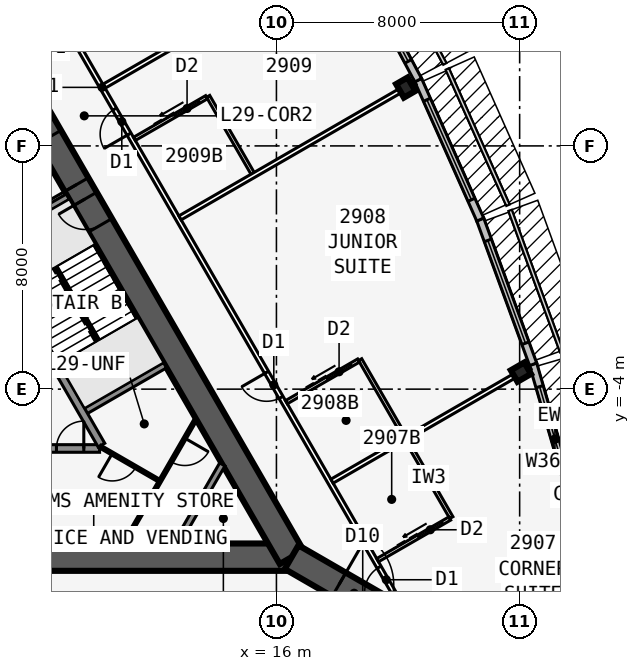
"""IFC4 building model, lengths in metres.
Left out: names, types, materials, properties, quantities, classifications, styles, units other than length and angle.
Written with IfcOpenShell. Run it as: python <this file> out.ifc"""

import sys

from ifc_helpers import new_model, si_unit, direction, frame, frame_2d, origin, origin_2d, place, context, subcontext, project, spatial, rectangle, i_section, extrude, element, fill, save


model = new_model("IFC4")
c1 = context("Model", 3, precision=1e-05, world=origin(), true_north=direction((0.0, 1.0)))
c2 = subcontext(c1, "Body", "Model", "MODEL_VIEW")
j1 = project(units=[si_unit("LENGTHUNIT", "METRE"), si_unit("PLANEANGLEUNIT", "RADIAN")], contexts=[c1])
p1 = place(None, origin())
s1 = spatial("IfcSite", under=j1, at=p1, CompositionType="ELEMENT")
p2 = place(p1, origin())
s2 = spatial("IfcBuilding", under=s1, at=p2, CompositionType="ELEMENT")
p3 = place(p2, frame((0.0, 0.0, 114.7)))
s3 = spatial("IfcBuildingStorey", under=s2, at=p3, CompositionType="ELEMENT", Elevation=114.7)
p4 = place(p3, frame((-16.5, -9.526, 0.0), z_axis=(0.0, 0.0, 1.0), x_axis=(1.0, 0.0, 0.0)))
e1 = element("IfcWall", 1, at=p4, inside=s3, PredefinedType="SHEAR", context=c2, shape_type="SweptSolid", body=[
    extrude(rectangle(XDim=33.0, YDim=0.9, at=frame_2d((16.5, 0.0))), origin(), (0.0, 0.0, 1.0), 3.4),
])
p5 = place(p4, frame((14.05, 0.0, 0.0)))
e2 = element("IfcOpeningElement", 2, at=p5, cuts=e1, PredefinedType="OPENING", context=c2, shape_type="SweptSolid", body=[
    extrude(rectangle(XDim=1.8, YDim=2.13, at=frame_2d((0.9, 1.065))), frame((0.0, 0.46, 0.0), z_axis=(0.0, -1.0, 0.0), x_axis=(1.0, 0.0, 0.0)), (0.0, 0.0, 1.0), 0.92),
])
p6 = place(p3, frame((-0.55, -5.951, 0.0), z_axis=(0.0, 0.0, 1.0), x_axis=(1.0, 0.0, 0.0)))
e3 = element("IfcWall", 3, at=p6, inside=s3, PredefinedType="SOLIDWALL", context=c2, shape_type="SweptSolid", body=[
    extrude(rectangle(XDim=10.733, YDim=0.25, at=frame_2d((5.366, 0.0))), origin(), (0.0, 0.0, 1.0), 3.235),
])
p7 = place(p6, frame((9.314, 0.0, 0.0)))
e4 = element("IfcOpeningElement", 4, at=p7, cuts=e3, PredefinedType="OPENING", context=c2, shape_type="SweptSolid", body=[
    extrude(rectangle(XDim=0.9, YDim=2.13, at=frame_2d((0.45, 1.065))), frame((0.0, 0.135, 0.0), z_axis=(0.0, -1.0, 0.0), x_axis=(1.0, 0.0, 0.0)), (0.0, 0.0, 1.0), 0.27),
])
p8 = place(p6, frame((1.05, 0.0, 0.0)))
e5 = element("IfcOpeningElement", 5, at=p8, cuts=e3, PredefinedType="OPENING", context=c2, shape_type="SweptSolid", body=[
    extrude(rectangle(XDim=1.1, YDim=2.13, at=frame_2d((0.55, 1.065))), frame((0.0, 0.135, 0.0), z_axis=(0.0, -1.0, 0.0), x_axis=(1.0, 0.0, 0.0)), (0.0, 0.0, 1.0), 0.27),
])
p9 = place(p6, frame((4.05, 0.0, 0.0)))
e6 = element("IfcOpeningElement", 6, at=p9, cuts=e3, PredefinedType="OPENING", context=c2, shape_type="SweptSolid", body=[
    extrude(rectangle(XDim=1.1, YDim=2.13, at=frame_2d((0.55, 1.065))), frame((0.0, 0.135, 0.0), z_axis=(0.0, -1.0, 0.0), x_axis=(1.0, 0.0, 0.0)), (0.0, 0.0, 1.0), 0.27),
])
p10 = place(p3, frame((16.5, -9.526, 0.0), z_axis=(0.0, 0.0, 1.0), x_axis=(-0.499999749417, 0.866025548458, 0.0)))
e7 = element("IfcWall", 7, at=p10, inside=s3, PredefinedType="SHEAR", context=c2, shape_type="SweptSolid", body=[
    extrude(rectangle(XDim=33.0, YDim=0.9, at=frame_2d((16.5, 0.0))), origin(), (0.0, 0.0, 1.0), 3.4),
])
p11 = place(p10, frame((14.15, 0.0, 0.0)))
e8 = element("IfcOpeningElement", 8, at=p11, cuts=e7, PredefinedType="OPENING", context=c2, shape_type="SweptSolid", body=[
    extrude(rectangle(XDim=1.8, YDim=2.13, at=frame_2d((0.9, 1.065))), frame((0.0, 0.46, 0.0), z_axis=(0.0, -1.0, 0.0), x_axis=(1.0, 0.0, 0.0)), (0.0, 0.0, 1.0), 0.92),
])
p12 = place(p10, frame((12.6, 0.0, 0.0)))
e9 = element("IfcOpeningElement", 9, at=p12, cuts=e7, PredefinedType="OPENING", context=c2, shape_type="SweptSolid", body=[
    extrude(rectangle(XDim=1.0, YDim=2.13, at=frame_2d((0.5, 1.065))), frame((0.0, 0.46, 0.0), z_axis=(0.0, -1.0, 0.0), x_axis=(1.0, 0.0, 0.0)), (0.0, 0.0, 1.0), 0.92),
])
p13 = place(p3, frame((10.245, -5.843, 0.0), z_axis=(0.0, 0.0, 1.0), x_axis=(-0.499993009313, 0.866029439822, 0.0)))
e10 = element("IfcWall", 10, at=p13, inside=s3, PredefinedType="SOLIDWALL", context=c2, shape_type="SweptSolid", body=[
    extrude(rectangle(XDim=7.733, YDim=0.25, at=frame_2d((3.866, 0.0))), origin(), (0.0, 0.0, 1.0), 3.235),
])
for number, where, z_axis, x_axis in (
    (11, (9.629, -4.775, 0.0), (0.0, 0.0, 1.0), (0.866, 0.5, 0.0)),
    (12, (6.429, 0.767, 0.0), (0.0, 0.0, 1.0), (0.866, 0.5, 0.0)),
):
    element("IfcWall", number, at=place(p3, frame(where, z_axis=z_axis, x_axis=x_axis)), inside=s3, PredefinedType="SOLIDWALL", context=c2, shape_type="SweptSolid", body=[
        extrude(rectangle(XDim=3.125, YDim=0.2, at=frame_2d((1.562, 0.0))), origin(), (0.0, 0.0, 1.0), 3.235),
    ])
p14 = place(p3, frame((16.5, -9.526, 0.0), z_axis=(0.0, 0.0, 1.0), x_axis=(0.866031398331, -0.499989616998, 0.0)))
e13 = element("IfcWall", 13, at=p14, inside=s3, PredefinedType="SHEAR", context=c2, shape_type="SweptSolid", body=[
    extrude(rectangle(XDim=4.746, YDim=0.9, at=frame_2d((2.373, 0.0))), origin(), (0.0, 0.0, 1.0), 3.4),
])
p15 = place(p14, frame((1.8, 0.0, 0.0)))
e14 = element("IfcOpeningElement", 14, at=p15, cuts=e13, PredefinedType="OPENING", context=c2, shape_type="SweptSolid", body=[
    extrude(rectangle(XDim=1.8, YDim=2.13, at=frame_2d((0.9, 1.065))), frame((0.0, 0.46, 0.0), z_axis=(0.0, -1.0, 0.0), x_axis=(1.0, 0.0, 0.0)), (0.0, 0.0, 1.0), 0.92),
])
for number, where, z_axis, x_axis in (
    (15, (24.041, -3.44, 0.0), (0.0, 0.0, 1.0), (-0.5, 0.866, 0.0)),
    (16, (20.254, 5.92, 0.0), (0.0, 0.0, 1.0), (0.866, 0.5, 0.0)),
):
    element("IfcColumn", number, at=place(p3, frame(where, z_axis=z_axis, x_axis=x_axis)), inside=s3, PredefinedType="COLUMN", context=c2, shape_type="SweptSolid", body=[
        extrude(i_section(OverallWidth=0.437, OverallDepth=0.513, WebThickness=0.061, FlangeThickness=0.097, at=origin_2d()), origin(), (0.0, 0.0, 1.0), 3.4),
    ])
p16 = place(p3, frame((25.88, -8.118, 0.0), z_axis=(0.0, 0.0, 1.0), x_axis=(-0.279528287117, 0.960137457191, 0.0)))
e17 = element("IfcWall", 17, at=p16, inside=s3, PredefinedType="STANDARD", context=c2, shape_type="SweptSolid", body=[
    extrude(rectangle(XDim=5.148, YDim=0.25, at=frame_2d((2.574, 0.0))), origin(), (0.0, 0.0, 1.0), 3.235),
])
p17 = place(p16, frame((0.774, 0.0, 0.45)))
e18 = element("IfcOpeningElement", 18, at=p17, cuts=e17, PredefinedType="OPENING", context=c2, shape_type="SweptSolid", body=[
    extrude(rectangle(XDim=3.6, YDim=2.4, at=frame_2d((1.8, 1.2))), frame((0.0, 0.135, 0.0), z_axis=(0.0, -1.0, 0.0), x_axis=(1.0, 0.0, 0.0)), (0.0, 0.0, 1.0), 0.27),
])
p18 = place(p3, frame((24.444, -3.183, 0.0), z_axis=(0.0, 0.0, 1.0), x_axis=(-0.343225593282, 0.939252996863, 0.0)))
e19 = element("IfcWall", 19, at=p18, inside=s3, PredefinedType="STANDARD", context=c2, shape_type="SweptSolid", body=[
    extrude(rectangle(XDim=5.076, YDim=0.25, at=frame_2d((2.538, 0.0))), origin(), (0.0, 0.0, 1.0), 3.235),
])
p19 = place(p18, frame((0.738, 0.0, 0.45)))
e20 = element("IfcOpeningElement", 20, at=p19, cuts=e19, PredefinedType="OPENING", context=c2, shape_type="SweptSolid", body=[
    extrude(rectangle(XDim=3.6, YDim=2.4, at=frame_2d((1.8, 1.2))), frame((0.0, 0.135, 0.0), z_axis=(0.0, -1.0, 0.0), x_axis=(1.0, 0.0, 0.0)), (0.0, 0.0, 1.0), 0.27),
])
p20 = place(p3, frame((22.705, 1.576, 0.0), z_axis=(0.0, 0.0, 1.0), x_axis=(-0.406832200364, 0.913502906808, 0.0)))
e21 = element("IfcWall", 21, at=p20, inside=s3, PredefinedType="STANDARD", context=c2, shape_type="SweptSolid", body=[
    extrude(rectangle(XDim=5.028, YDim=0.25, at=frame_2d((2.514, 0.0))), origin(), (0.0, 0.0, 1.0), 3.235),
])
p21 = place(p20, frame((0.714, 0.0, 0.45)))
e22 = element("IfcOpeningElement", 22, at=p21, cuts=e21, PredefinedType="OPENING", context=c2, shape_type="SweptSolid", body=[
    extrude(rectangle(XDim=3.6, YDim=2.4, at=frame_2d((1.8, 1.2))), frame((0.0, 0.135, 0.0), z_axis=(0.0, -1.0, 0.0), x_axis=(1.0, 0.0, 0.0)), (0.0, 0.0, 1.0), 0.27),
])
p22 = place(p3, frame((20.663, 6.161, 0.0), z_axis=(0.0, 0.0, 1.0), x_axis=(-0.469404966864, 0.882982999317, 0.0)))
e23 = element("IfcWall", 23, at=p22, inside=s3, PredefinedType="STANDARD", context=c2, shape_type="SweptSolid", body=[
    extrude(rectangle(XDim=5.003, YDim=0.25, at=frame_2d((2.501, 0.0))), origin(), (0.0, 0.0, 1.0), 3.235),
])
p23 = place(p22, frame((0.701, 0.0, 0.45)))
e24 = element("IfcOpeningElement", 24, at=p23, cuts=e23, PredefinedType="OPENING", context=c2, shape_type="SweptSolid", body=[
    extrude(rectangle(XDim=3.6, YDim=2.4, at=frame_2d((1.8, 1.2))), frame((0.0, 0.135, 0.0), z_axis=(0.0, -1.0, 0.0), x_axis=(1.0, 0.0, 0.0)), (0.0, 0.0, 1.0), 0.27),
])
p24 = place(p3, frame((20.027, -10.985, 0.0), z_axis=(0.0, 0.0, 1.0), x_axis=(-0.500001677587, 0.866024435227, 0.0)))
e25 = element("IfcWall", 25, at=p24, inside=s3, PredefinedType="PARTITIONING", context=c2, shape_type="SweptSolid", body=[
    extrude(rectangle(XDim=39.054, YDim=0.15, at=frame_2d((19.527, 0.0))), origin(), (0.0, 0.0, 1.0), 3.235),
])
p25 = place(p24, frame((0.352, 0.0, 0.0)))
e26 = element("IfcOpeningElement", 26, at=p25, cuts=e25, PredefinedType="OPENING", context=c2, shape_type="SweptSolid", body=[
    extrude(rectangle(XDim=0.95, YDim=2.13, at=frame_2d((0.475, 1.065))), frame((0.0, 0.085, 0.0), z_axis=(0.0, -1.0, 0.0), x_axis=(1.0, 0.0, 0.0)), (0.0, 0.0, 1.0), 0.17),
])
p26 = place(p24, frame((7.752, 0.0, 0.0)))
e27 = element("IfcOpeningElement", 27, at=p26, cuts=e25, PredefinedType="OPENING", context=c2, shape_type="SweptSolid", body=[
    extrude(rectangle(XDim=0.95, YDim=2.13, at=frame_2d((0.475, 1.065))), frame((0.0, 0.085, 0.0), z_axis=(0.0, -1.0, 0.0), x_axis=(1.0, 0.0, 0.0)), (0.0, 0.0, 1.0), 0.17),
])
p27 = place(p24, frame((17.752, 0.0, 0.0)))
e28 = element("IfcOpeningElement", 28, at=p27, cuts=e25, PredefinedType="OPENING", context=c2, shape_type="SweptSolid", body=[
    extrude(rectangle(XDim=0.95, YDim=2.13, at=frame_2d((0.475, 1.065))), frame((0.0, 0.085, 0.0), z_axis=(0.0, -1.0, 0.0), x_axis=(1.0, 0.0, 0.0)), (0.0, 0.0, 1.0), 0.17),
])
p28 = place(p24, frame((22.152, 0.0, 0.0)))
e29 = element("IfcOpeningElement", 29, at=p28, cuts=e25, PredefinedType="OPENING", context=c2, shape_type="SweptSolid", body=[
    extrude(rectangle(XDim=0.95, YDim=2.13, at=frame_2d((0.475, 1.065))), frame((0.0, 0.085, 0.0), z_axis=(0.0, -1.0, 0.0), x_axis=(1.0, 0.0, 0.0)), (0.0, 0.0, 1.0), 0.17),
])
p29 = place(p24, frame((27.152, 0.0, 0.0)))
e30 = element("IfcOpeningElement", 30, at=p29, cuts=e25, PredefinedType="OPENING", context=c2, shape_type="SweptSolid", body=[
    extrude(rectangle(XDim=0.95, YDim=2.13, at=frame_2d((0.475, 1.065))), frame((0.0, 0.085, 0.0), z_axis=(0.0, -1.0, 0.0), x_axis=(1.0, 0.0, 0.0)), (0.0, 0.0, 1.0), 0.17),
])
p30 = place(p24, frame((36.546, 0.0, 0.0)))
e31 = element("IfcOpeningElement", 31, at=p30, cuts=e25, PredefinedType="OPENING", context=c2, shape_type="SweptSolid", body=[
    extrude(rectangle(XDim=0.95, YDim=2.13, at=frame_2d((0.475, 1.065))), frame((0.0, 0.085, 0.0), z_axis=(0.0, -1.0, 0.0), x_axis=(1.0, 0.0, 0.0)), (0.0, 0.0, 1.0), 0.17),
])
p31 = place(p3, frame((17.829, -7.027, 0.0), z_axis=(0.0, 0.0, 1.0), x_axis=(0.866029804378, 0.499992377871, 0.0)))
e32 = element("IfcWall", 32, at=p31, inside=s3, PredefinedType="PARTITIONING", context=c2, shape_type="SweptSolid", body=[
    extrude(rectangle(XDim=7.516, YDim=0.15, at=frame_2d((3.758, 0.0))), origin(), (0.0, 0.0, 1.0), 2.389),
])
p32 = place(p3, frame((12.829, 1.633, 0.0), z_axis=(0.0, 0.0, 1.0), x_axis=(0.866027015393, 0.499997208602, 0.0)))
e33 = element("IfcWall", 33, at=p32, inside=s3, PredefinedType="PARTITIONING", context=c2, shape_type="SweptSolid", body=[
    extrude(rectangle(XDim=8.922, YDim=0.15, at=frame_2d((4.461, 0.0))), origin(), (0.0, 0.0, 1.0), 2.389),
])
p33 = place(p3, frame((10.329, 5.963, 0.0), z_axis=(0.0, 0.0, 1.0), x_axis=(0.866025170687, 0.500000403736, 0.0)))
e34 = element("IfcWall", 34, at=p33, inside=s3, PredefinedType="PARTITIONING", context=c2, shape_type="SweptSolid", body=[
    extrude(rectangle(XDim=9.099, YDim=0.15, at=frame_2d((4.549, 0.0))), origin(), (0.0, 0.0, 1.0), 2.389),
])
p34 = place(p3, frame((21.753, -8.225, 0.0), z_axis=(0.0, 0.0, 1.0), x_axis=(-0.499990139034, 0.866031096941, 0.0)))
e35 = element("IfcWall", 35, at=p34, inside=s3, PredefinedType="PLUMBINGWALL", context=c2, shape_type="SweptSolid", body=[
    extrude(rectangle(XDim=3.0, YDim=0.12, at=frame_2d((1.5, 0.0))), origin(), (0.0, 0.0, 1.0), 3.235),
])
p35 = place(p3, frame((19.329, -9.625, 0.0), z_axis=(0.0, 0.0, 1.0), x_axis=(0.866035715982, 0.499982138324, 0.0)))
e36 = element("IfcWall", 36, at=p35, inside=s3, PredefinedType="PLUMBINGWALL", context=c2, shape_type="SweptSolid", body=[
    extrude(rectangle(XDim=2.74, YDim=0.12, at=frame_2d((1.37, 0.0))), origin(), (0.0, 0.0, 1.0), 3.235),
])
p36 = place(p35, frame((1.55, 0.0, 0.0)))
e37 = element("IfcOpeningElement", 37, at=p36, cuts=e36, PredefinedType="OPENING", context=c2, shape_type="SweptSolid", body=[
    extrude(rectangle(XDim=0.9, YDim=2.13, at=frame_2d((0.45, 1.065))), frame((0.0, 0.07, 0.0), z_axis=(0.0, -1.0, 0.0), x_axis=(1.0, 0.0, 0.0)), (0.0, 0.0, 1.0), 0.14),
])
p37 = place(p3, frame((20.253, -5.627, 0.0), z_axis=(0.0, 0.0, 1.0), x_axis=(-0.50002537861, 0.866010750942, 0.0)))
e38 = element("IfcWall", 38, at=p37, inside=s3, PredefinedType="PLUMBINGWALL", context=c2, shape_type="SweptSolid", body=[
    extrude(rectangle(XDim=3.0, YDim=0.12, at=frame_2d((1.5, 0.0))), origin(), (0.0, 0.0, 1.0), 3.235),
])
p38 = place(p3, frame((16.329, -4.429, 0.0), z_axis=(0.0, 0.0, 1.0), x_axis=(0.865997131366, 0.500048966069, 0.0)))
e39 = element("IfcWall", 39, at=p38, inside=s3, PredefinedType="PLUMBINGWALL", context=c2, shape_type="SweptSolid", body=[
    extrude(rectangle(XDim=2.74, YDim=0.12, at=frame_2d((1.37, 0.0))), origin(), (0.0, 0.0, 1.0), 3.235),
])
p39 = place(p38, frame((1.55, 0.0, 0.0)))
e40 = element("IfcOpeningElement", 40, at=p39, cuts=e39, PredefinedType="OPENING", context=c2, shape_type="SweptSolid", body=[
    extrude(rectangle(XDim=0.9, YDim=2.13, at=frame_2d((0.45, 1.065))), frame((0.0, 0.07, 0.0), z_axis=(0.0, -1.0, 0.0), x_axis=(1.0, 0.0, 0.0)), (0.0, 0.0, 1.0), 0.14),
])
p40 = place(p3, frame((15.253, 3.033, 0.0), z_axis=(0.0, 0.0, 1.0), x_axis=(-0.499990139034, 0.866031096941, 0.0)))
e41 = element("IfcWall", 41, at=p40, inside=s3, PredefinedType="PLUMBINGWALL", context=c2, shape_type="SweptSolid", body=[
    extrude(rectangle(XDim=3.0, YDim=0.12, at=frame_2d((1.5, 0.0))), origin(), (0.0, 0.0, 1.0), 3.235),
])
p41 = place(p3, frame((11.329, 4.231, 0.0), z_axis=(0.0, 0.0, 1.0), x_axis=(0.866035715982, 0.499982138324, 0.0)))
e42 = element("IfcWall", 42, at=p41, inside=s3, PredefinedType="PLUMBINGWALL", context=c2, shape_type="SweptSolid", body=[
    extrude(rectangle(XDim=2.74, YDim=0.12, at=frame_2d((1.37, 0.0))), origin(), (0.0, 0.0, 1.0), 3.235),
])
p42 = place(p41, frame((1.55, 0.0, 0.0)))
e43 = element("IfcOpeningElement", 43, at=p42, cuts=e42, PredefinedType="OPENING", context=c2, shape_type="SweptSolid", body=[
    extrude(rectangle(XDim=0.9, YDim=2.13, at=frame_2d((0.45, 1.065))), frame((0.0, 0.07, 0.0), z_axis=(0.0, -1.0, 0.0), x_axis=(1.0, 0.0, 0.0)), (0.0, 0.0, 1.0), 0.14),
])
p43 = place(p3, frame((14.219, -6.476, 0.0), z_axis=(0.0, 0.0, 1.0), x_axis=(-0.499952404951, -0.866052881055, 0.0)))
e44 = element("IfcWall", 44, at=p43, inside=s3, PredefinedType="SOLIDWALL", context=c2, shape_type="SweptSolid", body=[
    extrude(rectangle(XDim=3.002, YDim=0.2, at=frame_2d((1.501, 0.0))), origin(), (0.0, 0.0, 1.0), 3.235),
])
p44 = place(p3, frame((13.354, -4.976, 0.0), z_axis=(0.0, 0.0, 1.0), x_axis=(-0.499999210213, -0.866025859768, 0.0)))
e45 = element("IfcWall", 45, at=p44, inside=s3, PredefinedType="PARTITIONING", context=c2, shape_type="SweptSolid", body=[
    extrude(rectangle(XDim=4.734, YDim=0.1, at=frame_2d((2.367, 0.0))), origin(), (0.0, 0.0, 1.0), 3.235),
])
p45 = place(p44, frame((0.734, 0.0, 0.0)))
e46 = element("IfcOpeningElement", 46, at=p45, cuts=e45, PredefinedType="OPENING", context=c2, shape_type="SweptSolid", body=[
    extrude(rectangle(XDim=0.9, YDim=2.13, at=frame_2d((0.45, 1.065))), frame((0.0, 0.06, 0.0), z_axis=(0.0, -1.0, 0.0), x_axis=(1.0, 0.0, 0.0)), (0.0, 0.0, 1.0), 0.12),
])
p46 = place(p3, frame((12.17, -7.026, 0.0), z_axis=(0.0, 0.0, 1.0), x_axis=(-0.866015833478, 0.50001657589, 0.0)))
e47 = element("IfcWall", 47, at=p46, inside=s3, PredefinedType="PARTITIONING", context=c2, shape_type="SweptSolid", body=[
    extrude(rectangle(XDim=2.275, YDim=0.1, at=frame_2d((1.138, 0.0))), origin(), (0.0, 0.0, 1.0), 3.235),
])
p47 = place(p46, frame((0.915, 0.0, 0.0)))
e48 = element("IfcOpeningElement", 48, at=p47, cuts=e47, PredefinedType="OPENING", context=c2, shape_type="SweptSolid", body=[
    extrude(rectangle(XDim=0.9, YDim=2.13, at=frame_2d((0.45, 1.065))), frame((0.0, 0.06, 0.0), z_axis=(0.0, -1.0, 0.0), x_axis=(1.0, 0.0, 0.0)), (0.0, 0.0, 1.0), 0.12),
])
p48 = place(p3, frame((10.135, -2.401, 0.0), z_axis=(0.0, 0.0, 1.0), x_axis=(-0.499992232847, 0.866029888106, 0.0)))
e49 = element("IfcWall", 49, at=p48, inside=s3, PredefinedType="SOLIDWALL", context=c2, shape_type="SweptSolid", body=[
    extrude(rectangle(XDim=2.794, YDim=0.1, at=frame_2d((1.397, 0.0))), origin(), (0.0, 0.0, 1.0), 3.4),
])
p49 = place(p17, origin())
e50 = element("IfcWindow", 50, at=p49, inside=s3, PartitioningType="SINGLE_PANEL", PredefinedType="WINDOW", context=c2, shape_type="SweptSolid", body=[
    extrude(rectangle(XDim=3.6, YDim=2.4, at=frame_2d((1.8, 1.2))), frame((0.0, 0.03, 0.0), z_axis=(0.0, -1.0, 0.0), x_axis=(1.0, 0.0, 0.0)), (0.0, 0.0, 1.0), 0.06),
])
fill(e18, e50)
p50 = place(p19, origin())
e51 = element("IfcWindow", 51, at=p50, inside=s3, PartitioningType="SINGLE_PANEL", PredefinedType="WINDOW", context=c2, shape_type="SweptSolid", body=[
    extrude(rectangle(XDim=3.6, YDim=2.4, at=frame_2d((1.8, 1.2))), frame((0.0, 0.03, 0.0), z_axis=(0.0, -1.0, 0.0), x_axis=(1.0, 0.0, 0.0)), (0.0, 0.0, 1.0), 0.06),
])
fill(e20, e51)
p51 = place(p21, origin())
e52 = element("IfcWindow", 52, at=p51, inside=s3, PartitioningType="SINGLE_PANEL", PredefinedType="WINDOW", context=c2, shape_type="SweptSolid", body=[
    extrude(rectangle(XDim=3.6, YDim=2.4, at=frame_2d((1.8, 1.2))), frame((0.0, 0.03, 0.0), z_axis=(0.0, -1.0, 0.0), x_axis=(1.0, 0.0, 0.0)), (0.0, 0.0, 1.0), 0.06),
])
fill(e22, e52)
p52 = place(p23, origin())
e53 = element("IfcWindow", 53, at=p52, inside=s3, PartitioningType="SINGLE_PANEL", PredefinedType="WINDOW", context=c2, shape_type="SweptSolid", body=[
    extrude(rectangle(XDim=3.6, YDim=2.4, at=frame_2d((1.8, 1.2))), frame((0.0, 0.03, 0.0), z_axis=(0.0, -1.0, 0.0), x_axis=(1.0, 0.0, 0.0)), (0.0, 0.0, 1.0), 0.06),
])
fill(e24, e53)
p53 = place(p36, origin())
e54 = element("IfcDoor", 54, at=p53, inside=s3, OperationType="SLIDING_TO_LEFT", PredefinedType="DOOR", context=c2, shape_type="SweptSolid", body=[
    extrude(rectangle(XDim=0.9, YDim=2.13, at=frame_2d((0.45, 1.065))), frame((0.0, 0.025, 0.0), z_axis=(0.0, -1.0, 0.0), x_axis=(1.0, 0.0, 0.0)), (0.0, 0.0, 1.0), 0.05),
])
fill(e37, e54)
p54 = place(p25, origin())
e55 = element("IfcDoor", 55, at=p54, inside=s3, OperationType="SINGLE_SWING_LEFT", PredefinedType="DOOR", context=c2, shape_type="SweptSolid", body=[
    extrude(rectangle(XDim=0.95, YDim=2.13, at=frame_2d((0.475, 1.065))), frame((0.0, 0.025, 0.0), z_axis=(0.0, -1.0, 0.0), x_axis=(1.0, 0.0, 0.0)), (0.0, 0.0, 1.0), 0.05),
])
fill(e26, e55)
p55 = place(p39, origin())
e56 = element("IfcDoor", 56, at=p55, inside=s3, OperationType="SLIDING_TO_LEFT", PredefinedType="DOOR", context=c2, shape_type="SweptSolid", body=[
    extrude(rectangle(XDim=0.9, YDim=2.13, at=frame_2d((0.45, 1.065))), frame((0.0, 0.025, 0.0), z_axis=(0.0, -1.0, 0.0), x_axis=(1.0, 0.0, 0.0)), (0.0, 0.0, 1.0), 0.05),
])
fill(e40, e56)
p56 = place(p26, origin())
e57 = element("IfcDoor", 57, at=p56, inside=s3, OperationType="SINGLE_SWING_RIGHT", PredefinedType="DOOR", context=c2, shape_type="SweptSolid", body=[
    extrude(rectangle(XDim=0.95, YDim=2.13, at=frame_2d((0.475, 1.065))), frame((0.0, 0.025, 0.0), z_axis=(0.0, -1.0, 0.0), x_axis=(1.0, 0.0, 0.0)), (0.0, 0.0, 1.0), 0.05),
])
fill(e27, e57)
p57 = place(p42, origin())
e58 = element("IfcDoor", 58, at=p57, inside=s3, OperationType="SLIDING_TO_LEFT", PredefinedType="DOOR", context=c2, shape_type="SweptSolid", body=[
    extrude(rectangle(XDim=0.9, YDim=2.13, at=frame_2d((0.45, 1.065))), frame((0.0, 0.025, 0.0), z_axis=(0.0, -1.0, 0.0), x_axis=(1.0, 0.0, 0.0)), (0.0, 0.0, 1.0), 0.05),
])
fill(e43, e58)
p58 = place(p27, origin())
e59 = element("IfcDoor", 59, at=p58, inside=s3, OperationType="SINGLE_SWING_LEFT", PredefinedType="DOOR", context=c2, shape_type="SweptSolid", body=[
    extrude(rectangle(XDim=0.95, YDim=2.13, at=frame_2d((0.475, 1.065))), frame((0.0, 0.025, 0.0), z_axis=(0.0, -1.0, 0.0), x_axis=(1.0, 0.0, 0.0)), (0.0, 0.0, 1.0), 0.05),
])
fill(e28, e59)
p59 = place(p11, origin())
e60 = element("IfcDoor", 60, at=p59, inside=s3, OperationType="DOUBLE_DOOR_SINGLE_SWING", PredefinedType="DOOR", context=c2, shape_type="SweptSolid", body=[
    extrude(rectangle(XDim=1.8, YDim=2.13, at=frame_2d((0.9, 1.065))), frame((0.0, 0.025, 0.0), z_axis=(0.0, -1.0, 0.0), x_axis=(1.0, 0.0, 0.0)), (0.0, 0.0, 1.0), 0.05),
])
fill(e8, e60)
p60 = place(p12, origin())
e61 = element("IfcDoor", 61, at=p60, inside=s3, OperationType="SINGLE_SWING_RIGHT", PredefinedType="DOOR", context=c2, shape_type="SweptSolid", body=[
    extrude(rectangle(XDim=1.0, YDim=2.13, at=frame_2d((0.5, 1.065))), frame((0.0, 0.025, 0.0), z_axis=(0.0, -1.0, 0.0), x_axis=(1.0, 0.0, 0.0)), (0.0, 0.0, 1.0), 0.05),
])
fill(e9, e61)
p61 = place(p15, origin())
e62 = element("IfcDoor", 62, at=p61, inside=s3, OperationType="DOUBLE_DOOR_DOUBLE_SWING", PredefinedType="DOOR", context=c2, shape_type="SweptSolid", body=[
    extrude(rectangle(XDim=1.8, YDim=2.13, at=frame_2d((0.9, 1.065))), frame((0.0, 0.025, 0.0), z_axis=(0.0, -1.0, 0.0), x_axis=(1.0, 0.0, 0.0)), (0.0, 0.0, 1.0), 0.05),
])
fill(e14, e62)
p62 = place(p45, origin())
e63 = element("IfcDoor", 63, at=p62, inside=s3, OperationType="SINGLE_SWING_LEFT", PredefinedType="DOOR", context=c2, shape_type="SweptSolid", body=[
    extrude(rectangle(XDim=0.9, YDim=2.13, at=frame_2d((0.45, 1.065))), frame((0.0, 0.025, 0.0), z_axis=(0.0, -1.0, 0.0), x_axis=(1.0, 0.0, 0.0)), (0.0, 0.0, 1.0), 0.05),
])
fill(e46, e63)
p63 = place(p7, origin())
e64 = element("IfcDoor", 64, at=p63, inside=s3, OperationType="SINGLE_SWING_RIGHT", PredefinedType="DOOR", context=c2, shape_type="SweptSolid", body=[
    extrude(rectangle(XDim=0.9, YDim=2.13, at=frame_2d((0.45, 1.065))), frame((0.0, 0.025, 0.0), z_axis=(0.0, -1.0, 0.0), x_axis=(1.0, 0.0, 0.0)), (0.0, 0.0, 1.0), 0.05),
])
fill(e4, e64)
p64 = place(p47, origin())
e65 = element("IfcDoor", 65, at=p64, inside=s3, OperationType="SINGLE_SWING_RIGHT", PredefinedType="DOOR", context=c2, shape_type="SweptSolid", body=[
    extrude(rectangle(XDim=0.9, YDim=2.13, at=frame_2d((0.45, 1.065))), frame((0.0, 0.025, 0.0), z_axis=(0.0, -1.0, 0.0), x_axis=(1.0, 0.0, 0.0)), (0.0, 0.0, 1.0), 0.05),
])
fill(e48, e65)
save(model, sys.argv[1])
